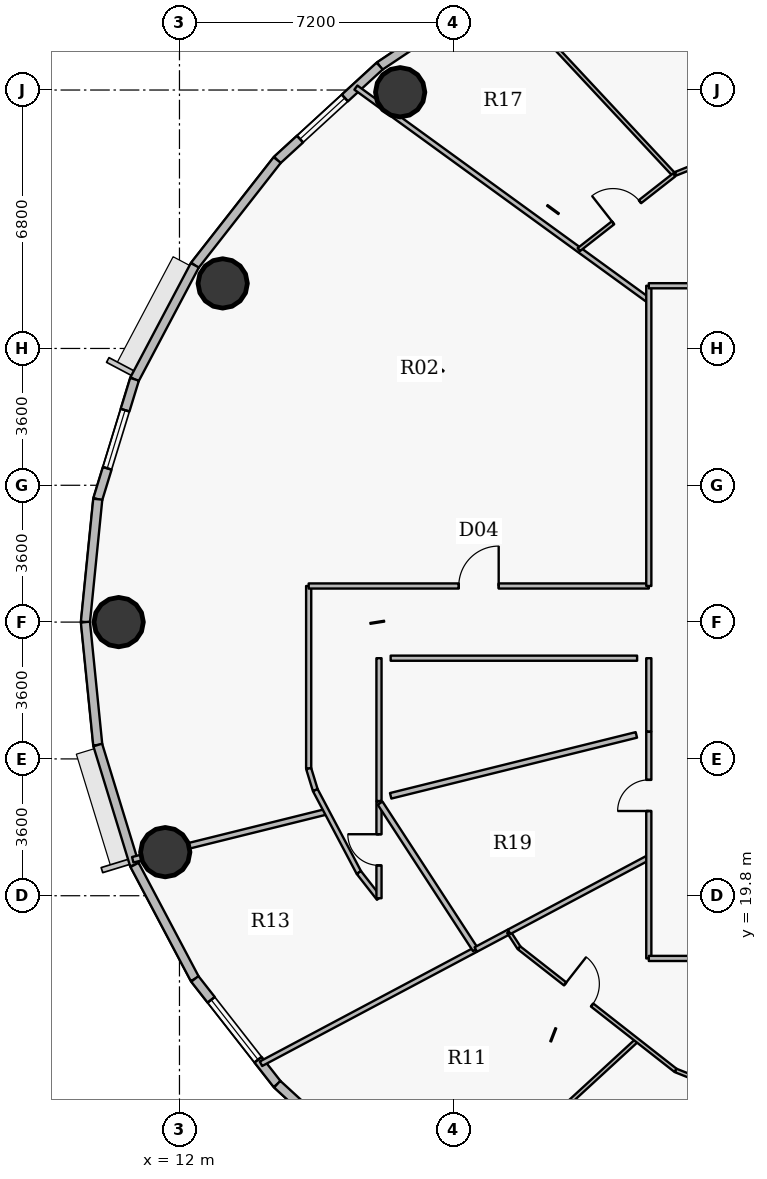
"""IFC4 building model, lengths in metres.
Left out: names, types, materials, properties, quantities, classifications, styles, units other than length and angle.
Written with IfcOpenShell. Run it as: python <this file> out.ifc"""

import sys

from ifc_helpers import new_model, si_unit, direction, frame, frame_2d, origin, origin_2d, place, context, subcontext, project, spatial, rectangle, hollow_circle, extrude, source, transform, mapped, element, fill, save


model = new_model("IFC4")
c1 = context("Model", 3, precision=1e-05, world=origin(), true_north=direction((0.0, 1.0)))
c2 = subcontext(c1, "Body", "Model", "MODEL_VIEW")
j1 = project(units=[si_unit("LENGTHUNIT", "METRE"), si_unit("PLANEANGLEUNIT", "RADIAN")], contexts=[c1])
p1 = place(None, origin())
s1 = spatial("IfcSite", under=j1, at=p1, CompositionType="ELEMENT")
p2 = place(p1, origin())
s2 = spatial("IfcBuilding", under=s1, at=p2, CompositionType="ELEMENT")
p3 = place(p2, frame((0.0, 0.0, 193.65)))
s3 = spatial("IfcBuildingStorey", under=s2, at=p3, CompositionType="ELEMENT", Elevation=193.65)
for number, where, z_axis, x_axis in (
    (1, (17.808, 40.942, 0.0), (0.0, 0.0, 1.0), (1.0, 0.0, 0.0)),
    (2, (13.137, 35.911, 0.0), (0.0, 0.0, 1.0), (1.0, 0.0, 0.0)),
    (3, (10.4, 27.0, 0.0), (0.0, 0.0, 1.0), (1.0, 0.0, 0.0)),
    (4, (11.625, 20.947, 0.0), (0.0, 0.0, 1.0), (1.0, 0.0, 0.0)),
):
    element("IfcColumn", number, at=place(p3, frame(where, z_axis=z_axis, x_axis=x_axis)), inside=s3, PredefinedType="COLUMN", context=c2, shape_type="SweptSolid", body=[
        extrude(hollow_circle(Radius=0.65, WallThickness=0.04, at=origin_2d()), origin(), (0.0, 0.0, 1.0), 3.75),
    ])
p4 = place(p3, frame((17.268, 41.631, 0.0), z_axis=(0.0, 0.0, 1.0), x_axis=(0.831228998277, 0.555930168657, 0.0)))
e5 = element("IfcWall", 5, at=p4, inside=s3, PredefinedType="SOLIDWALL", context=c2, shape_type="SweptSolid", body=[
    extrude(rectangle(XDim=3.8, YDim=0.24, at=frame_2d((1.9, 0.0))), origin(), (0.0, 0.0, 1.0), 3.5),
])
p5 = place(p3, frame((14.572, 39.158, 0.0), z_axis=(0.0, 0.0, 1.0), x_axis=(0.737076565834, 0.675809245349, 0.0)))
e6 = element("IfcWall", 6, at=p5, inside=s3, PredefinedType="SOLIDWALL", context=c2, shape_type="SweptSolid", body=[
    extrude(rectangle(XDim=3.658, YDim=0.24, at=frame_2d((1.829, 0.0))), origin(), (0.0, 0.0, 1.0), 3.5),
])
p6 = place(p5, frame((0.815, 0.0, 0.9)))
e7 = element("IfcOpeningElement", 7, at=p6, cuts=e6, PredefinedType="OPENING", context=c2, shape_type="SweptSolid", body=[
    extrude(rectangle(XDim=1.6, YDim=1.75, at=origin_2d()), frame((0.8, 0.13, 0.875), z_axis=(0.0, -1.0, 0.0), x_axis=(1.0, 0.0, 0.0)), (0.0, 0.0, 1.0), 0.26),
])
p7 = place(p3, frame((12.404, 36.388, 0.0), z_axis=(0.0, 0.0, 1.0), x_axis=(0.616287674549, 0.787521112224, 0.0)))
e8 = element("IfcWall", 8, at=p7, inside=s3, PredefinedType="SOLIDWALL", context=c2, shape_type="SweptSolid", body=[
    extrude(rectangle(XDim=3.517, YDim=0.24, at=frame_2d((1.759, 0.0))), origin(), (0.0, 0.0, 1.0), 3.5),
])
p8 = place(p3, frame((10.817, 33.389, 0.0), z_axis=(0.0, 0.0, 1.0), x_axis=(0.467586874938, 0.88394712194, 0.0)))
e9 = element("IfcWall", 9, at=p8, inside=s3, PredefinedType="SOLIDWALL", context=c2, shape_type="SweptSolid", body=[
    extrude(rectangle(XDim=3.393, YDim=0.24, at=frame_2d((1.697, 0.0))), origin(), (0.0, 0.0, 1.0), 3.5),
])
p9 = place(p3, frame((9.85, 30.234, 0.0), z_axis=(0.0, 0.0, 1.0), x_axis=(0.293097995113, 0.956082405058, 0.0)))
e10 = element("IfcWall", 10, at=p9, inside=s3, PredefinedType="SOLIDWALL", context=c2, shape_type="SweptSolid", body=[
    extrude(rectangle(XDim=3.3, YDim=0.24, at=frame_2d((1.65, 0.0))), origin(), (0.0, 0.0, 1.0), 3.5),
])
p10 = place(p9, frame((0.85, 0.0, 0.9)))
e11 = element("IfcOpeningElement", 11, at=p10, cuts=e10, PredefinedType="OPENING", context=c2, shape_type="SweptSolid", body=[
    extrude(rectangle(XDim=1.6, YDim=1.75, at=origin_2d()), frame((0.8, 0.13, 0.875), z_axis=(0.0, -1.0, 0.0), x_axis=(1.0, 0.0, 0.0)), (0.0, 0.0, 1.0), 0.26),
])
for number, where, z_axis, x_axis in (
    (12, (9.525, 27.0, 0.0), (0.0, 0.0, 1.0), (0.1, 0.995, 0.0)),
    (13, (9.85, 23.766, 0.0), (0.0, 0.0, 1.0), (-0.1, 0.995, 0.0)),
):
    element("IfcWall", number, at=place(p3, frame(where, z_axis=z_axis, x_axis=x_axis)), inside=s3, PredefinedType="SOLIDWALL", context=c2, shape_type="SweptSolid", body=[
        extrude(rectangle(XDim=3.25, YDim=0.24, at=frame_2d((1.625, 0.0))), origin(), (0.0, 0.0, 1.0), 3.5),
    ])
p11 = place(p3, frame((10.817, 20.611, 0.0), z_axis=(0.0, 0.0, 1.0), x_axis=(-0.293097995113, 0.956082405058, 0.0)))
e14 = element("IfcWall", 14, at=p11, inside=s3, PredefinedType="SOLIDWALL", context=c2, shape_type="SweptSolid", body=[
    extrude(rectangle(XDim=3.3, YDim=0.24, at=frame_2d((1.65, 0.0))), origin(), (0.0, 0.0, 1.0), 3.5),
])
p12 = place(p3, frame((12.404, 17.612, 0.0), z_axis=(0.0, 0.0, 1.0), x_axis=(-0.467586874938, 0.88394712194, 0.0)))
e15 = element("IfcWall", 15, at=p12, inside=s3, PredefinedType="SOLIDWALL", context=c2, shape_type="SweptSolid", body=[
    extrude(rectangle(XDim=3.393, YDim=0.24, at=frame_2d((1.697, 0.0))), origin(), (0.0, 0.0, 1.0), 3.5),
])
p13 = place(p3, frame((14.572, 14.842, 0.0), z_axis=(0.0, 0.0, 1.0), x_axis=(-0.616287674549, 0.787521112224, 0.0)))
e16 = element("IfcWall", 16, at=p13, inside=s3, PredefinedType="SOLIDWALL", context=c2, shape_type="SweptSolid", body=[
    extrude(rectangle(XDim=3.517, YDim=0.24, at=frame_2d((1.759, 0.0))), origin(), (0.0, 0.0, 1.0), 3.5),
])
p14 = place(p13, frame((0.819, 0.0, 0.9)))
e17 = element("IfcOpeningElement", 17, at=p14, cuts=e16, PredefinedType="OPENING", context=c2, shape_type="SweptSolid", body=[
    extrude(rectangle(XDim=2.0, YDim=1.75, at=origin_2d()), frame((1.0, 0.13, 0.875), z_axis=(0.0, -1.0, 0.0), x_axis=(1.0, 0.0, 0.0)), (0.0, 0.0, 1.0), 0.26),
])
p15 = place(p3, frame((17.268, 12.369, 0.0), z_axis=(0.0, 0.0, 1.0), x_axis=(-0.737076565834, 0.675809245349, 0.0)))
e18 = element("IfcWall", 18, at=p15, inside=s3, PredefinedType="SOLIDWALL", context=c2, shape_type="SweptSolid", body=[
    extrude(rectangle(XDim=3.658, YDim=0.24, at=frame_2d((1.829, 0.0))), origin(), (0.0, 0.0, 1.0), 3.5),
])
p16 = place(p15, frame((1.204, 0.0, 0.9)))
e19 = element("IfcOpeningElement", 19, at=p16, cuts=e18, PredefinedType="OPENING", context=c2, shape_type="SweptSolid", body=[
    extrude(rectangle(XDim=1.25, YDim=1.65, at=origin_2d()), frame((0.625, 0.13, 0.825), z_axis=(0.0, -1.0, 0.0), x_axis=(1.0, 0.0, 0.0)), (0.0, 0.0, 1.0), 0.26),
])
p17 = place(p3, frame((10.771, 20.747, 0.0), z_axis=(0.0, 0.0, 1.0), x_axis=(0.970640303721, 0.240535653891, 0.0)))
e20 = element("IfcWall", 20, at=p17, inside=s3, PredefinedType="PARTITIONING", context=c2, shape_type="SweptSolid", body=[
    extrude(rectangle(XDim=5.258, YDim=0.15, at=frame_2d((2.629, 0.0))), origin(), (0.0, 0.0, 1.0), 2.935),
])
p18 = place(p3, frame((14.145, 15.379, 0.0), z_axis=(0.0, 0.0, 1.0), x_axis=(0.882932689309, 0.469499591214, 0.0)))
e21 = element("IfcWall", 21, at=p18, inside=s3, PredefinedType="PARTITIONING", context=c2, shape_type="SweptSolid", body=[
    extrude(rectangle(XDim=6.392, YDim=0.135, at=frame_2d((3.196, 0.0))), origin(), (0.0, 0.0, 1.0), 2.935),
])
p19 = place(p3, frame((15.4, 23.146, 0.0), z_axis=(0.0, 0.0, 1.0), x_axis=(0.0, 1.0, 0.0)))
e22 = element("IfcWall", 22, at=p19, inside=s3, PredefinedType="PARTITIONING", context=c2, shape_type="SweptSolid", body=[
    extrude(rectangle(XDim=4.804, YDim=0.135, at=frame_2d((2.402, 0.0))), origin(), (0.0, 0.0, 1.0), 2.935),
])
p20 = place(p3, frame((15.4, 23.146, 0.0), z_axis=(0.0, 0.0, 1.0), x_axis=(0.293335154151, -0.956009669061, 0.0)))
e23 = element("IfcWall", 23, at=p20, inside=s3, PredefinedType="PARTITIONING", context=c2, shape_type="SweptSolid", body=[
    extrude(rectangle(XDim=0.594, YDim=0.135, at=frame_2d((0.297, 0.0))), origin(), (0.0, 0.0, 1.0), 3.5),
])
p21 = place(p3, frame((15.4, 27.95, 0.0), z_axis=(0.0, 0.0, 1.0), x_axis=(1.0, 0.0, 0.0)))
e24 = element("IfcWall", 24, at=p21, inside=s3, PredefinedType="PARTITIONING", context=c2, shape_type="SweptSolid", body=[
    extrude(rectangle(XDim=8.95, YDim=0.135, at=frame_2d((4.475, 0.0))), origin(), (0.0, 0.0, 1.0), 3.5),
])
p22 = place(p21, frame((3.95, 0.0, 0.0)))
e25 = element("IfcOpeningElement", 25, at=p22, cuts=e24, PredefinedType="OPENING", context=c2, shape_type="SweptSolid", body=[
    extrude(rectangle(XDim=1.05, YDim=2.15, at=origin_2d()), frame((0.525, 0.078, 1.075), z_axis=(0.0, -1.0, 0.0), x_axis=(1.0, 0.0, 0.0)), (0.0, 0.0, 1.0), 0.155),
])
p23 = place(p3, frame((15.574, 22.578, 0.0), z_axis=(0.0, 0.0, 1.0), x_axis=(0.467530807018, -0.883976778252, 0.0)))
e26 = element("IfcWall", 26, at=p23, inside=s3, PredefinedType="PARTITIONING", context=c2, shape_type="SweptSolid", body=[
    extrude(rectangle(XDim=2.452, YDim=0.135, at=frame_2d((1.226, 0.0))), origin(), (0.0, 0.0, 1.0), 2.935),
])
p24 = place(p3, frame((16.643, 41.064, 0.0), z_axis=(0.0, 0.0, 1.0), x_axis=(0.809016355942, -0.587786131018, 0.0)))
e27 = element("IfcWall", 27, at=p24, inside=s3, PredefinedType="PARTITIONING", context=c2, shape_type="SweptSolid", body=[
    extrude(rectangle(XDim=9.527, YDim=0.135, at=frame_2d((4.764, 0.0))), origin(), (0.0, 0.0, 1.0), 2.935),
])
p25 = place(p3, frame((16.72, 20.411, 0.0), z_axis=(0.0, 0.0, 1.0), x_axis=(0.616377221056, -0.787451027914, 0.0)))
e28 = element("IfcWall", 28, at=p25, inside=s3, PredefinedType="PARTITIONING", context=c2, shape_type="SweptSolid", body=[
    extrude(rectangle(XDim=0.859, YDim=0.135, at=frame_2d((0.43, 0.0))), origin(), (0.0, 0.0, 1.0), 3.5),
])
p26 = place(p3, frame((17.25, 19.734, 0.0), z_axis=(0.0, 0.0, 1.0), x_axis=(0.0, 1.0, 0.0)))
e29 = element("IfcWall", 29, at=p26, inside=s3, PredefinedType="PARTITIONING", context=c2, shape_type="SweptSolid", body=[
    extrude(rectangle(XDim=2.548, YDim=0.135, at=frame_2d((1.274, 0.0))), origin(), (0.0, 0.0, 1.0), 2.935),
])
p27 = place(p26, frame((0.864, 0.0, 0.0)))
e30 = element("IfcOpeningElement", 30, at=p27, cuts=e29, PredefinedType="OPENING", context=c2, shape_type="SweptSolid", body=[
    extrude(rectangle(XDim=0.82, YDim=2.1, at=origin_2d()), frame((0.41, 0.078, 1.05), z_axis=(0.0, -1.0, 0.0), x_axis=(1.0, 0.0, 0.0)), (0.0, 0.0, 1.0), 0.155),
])
p28 = place(p3, frame((17.279, 22.237, 0.0), z_axis=(0.0, 0.0, 1.0), x_axis=(0.545383699519, -0.83818650687, 0.0)))
e31 = element("IfcWall", 31, at=p28, inside=s3, PredefinedType="PARTITIONING", context=c2, shape_type="SweptSolid", body=[
    extrude(rectangle(XDim=4.601, YDim=0.15, at=frame_2d((2.3, 0.0))), origin(), (0.0, 0.0, 1.0), 2.935),
])
p29 = place(p3, frame((18.899, 11.272, 0.0), z_axis=(0.0, 0.0, 1.0), x_axis=(0.736047362481, 0.676930040834, 0.0)))
e32 = element("IfcWall", 32, at=p29, inside=s3, PredefinedType="PARTITIONING", context=c2, shape_type="SweptSolid", body=[
    extrude(rectangle(XDim=6.983, YDim=0.1, at=frame_2d((3.492, 0.0))), origin(), (0.0, 0.0, 1.0), 2.935),
])
p30 = place(p3, frame((19.798, 18.385, 0.0), z_axis=(0.0, 0.0, 1.0), x_axis=(0.882964446326, 0.469439864652, 0.0)))
e33 = element("IfcWall", 33, at=p30, inside=s3, PredefinedType="PARTITIONING", context=c2, shape_type="SweptSolid", body=[
    extrude(rectangle(XDim=0.982, YDim=0.135, at=frame_2d((0.491, 0.0))), origin(), (0.0, 0.0, 1.0), 3.5),
])
p31 = place(p3, frame((20.39, 43.725, 0.0), z_axis=(0.0, 0.0, 1.0), x_axis=(0.682297728918, -0.73107442105, 0.0)))
e34 = element("IfcWall", 34, at=p31, inside=s3, PredefinedType="PARTITIONING", context=c2, shape_type="SweptSolid", body=[
    extrude(rectangle(XDim=6.782, YDim=0.1, at=frame_2d((3.391, 0.0))), origin(), (0.0, 0.0, 1.0), 2.935),
])
p32 = place(p3, frame((20.665, 18.846, 0.0), z_axis=(0.0, 0.0, 1.0), x_axis=(0.545143704476, -0.838342615802, 0.0)))
e35 = element("IfcWall", 35, at=p32, inside=s3, PredefinedType="PARTITIONING", context=c2, shape_type="SweptSolid", body=[
    extrude(rectangle(XDim=0.497, YDim=0.1, at=frame_2d((0.249, 0.0))), origin(), (0.0, 0.0, 1.0), 3.5),
])
p33 = place(p3, frame((20.674, 18.851, 0.0), z_axis=(0.0, 0.0, 1.0), x_axis=(0.882934968765, 0.469495304483, 0.0)))
e36 = element("IfcWall", 36, at=p33, inside=s3, PredefinedType="PARTITIONING", context=c2, shape_type="SweptSolid", body=[
    extrude(rectangle(XDim=4.164, YDim=0.135, at=frame_2d((2.082, 0.0))), origin(), (0.0, 0.0, 1.0), 3.5),
])
p34 = place(p3, frame((20.936, 18.429, 0.0), z_axis=(0.0, 0.0, 1.0), x_axis=(0.787322805473, -0.61654099619, 0.0)))
e37 = element("IfcWall", 37, at=p34, inside=s3, PredefinedType="PARTITIONING", context=c2, shape_type="SweptSolid", body=[
    extrude(rectangle(XDim=5.232, YDim=0.1, at=frame_2d((2.616, 0.0))), origin(), (0.0, 0.0, 1.0), 2.935),
])
p35 = place(p34, frame((1.541, 0.0, 0.0)))
e38 = element("IfcOpeningElement", 38, at=p35, cuts=e37, PredefinedType="OPENING", context=c2, shape_type="SweptSolid", body=[
    extrude(rectangle(XDim=0.9, YDim=2.1, at=origin_2d()), frame((0.45, 0.06, 1.05), z_axis=(0.0, -1.0, 0.0), x_axis=(1.0, 0.0, 0.0)), (0.0, 0.0, 1.0), 0.12),
])
p36 = place(p3, frame((22.509, 36.802, 0.0), z_axis=(0.0, 0.0, 1.0), x_axis=(0.787322269852, 0.616541680177, 0.0)))
e39 = element("IfcWall", 39, at=p36, inside=s3, PredefinedType="PARTITIONING", context=c2, shape_type="SweptSolid", body=[
    extrude(rectangle(XDim=3.187, YDim=0.1, at=frame_2d((1.593, 0.0))), origin(), (0.0, 0.0, 1.0), 2.935),
])
p37 = place(p36, frame((1.143, 0.0, 0.0)))
e40 = element("IfcOpeningElement", 40, at=p37, cuts=e39, PredefinedType="OPENING", context=c2, shape_type="SweptSolid", body=[
    extrude(rectangle(XDim=0.9, YDim=2.1, at=origin_2d()), frame((0.45, 0.06, 1.05), z_axis=(0.0, -1.0, 0.0), x_axis=(1.0, 0.0, 0.0)), (0.0, 0.0, 1.0), 0.12),
])
p38 = place(p3, frame((23.136, 8.951, 0.0), z_axis=(0.0, 0.0, 1.0), x_axis=(0.580415349728, 0.814320589081, 0.0)))
e41 = element("IfcWall", 41, at=p38, inside=s3, PredefinedType="PARTITIONING", context=c2, shape_type="SweptSolid", body=[
    extrude(rectangle(XDim=6.71, YDim=0.1, at=frame_2d((3.355, 0.0))), origin(), (0.0, 0.0, 1.0), 2.935),
])
p39 = place(p3, frame((24.35, 18.15, 0.0), z_axis=(0.0, 0.0, 1.0), x_axis=(0.0, 1.0, 0.0)))
e42 = element("IfcWall", 42, at=p39, inside=s3, PredefinedType="PARTITIONING", context=c2, shape_type="SweptSolid", body=[
    extrude(rectangle(XDim=5.963, YDim=0.135, at=frame_2d((2.981, 0.0))), origin(), (0.0, 0.0, 1.0), 2.935),
])
p40 = place(p39, frame((3.879, 0.0, 0.0)))
e43 = element("IfcOpeningElement", 43, at=p40, cuts=e42, PredefinedType="OPENING", context=c2, shape_type="SweptSolid", body=[
    extrude(rectangle(XDim=0.82, YDim=2.1, at=origin_2d()), frame((0.41, 0.078, 1.05), z_axis=(0.0, -1.0, 0.0), x_axis=(1.0, 0.0, 0.0)), (0.0, 0.0, 1.0), 0.155),
])
p41 = place(p3, frame((24.35, 18.15, 0.0), z_axis=(0.0, 0.0, 1.0), x_axis=(1.0, 0.0, 0.0)))
e44 = element("IfcWall", 44, at=p41, inside=s3, PredefinedType="PARTITIONING", context=c2, shape_type="SweptSolid", body=[
    extrude(rectangle(XDim=9.109, YDim=0.135, at=frame_2d((4.554, 0.0))), origin(), (0.0, 0.0, 1.0), 2.935),
])
p42 = place(p41, frame((4.054, 0.0, 0.0)))
e45 = element("IfcOpeningElement", 45, at=p42, cuts=e44, PredefinedType="OPENING", context=c2, shape_type="SweptSolid", body=[
    extrude(rectangle(XDim=1.0, YDim=2.15, at=origin_2d()), frame((0.5, 0.078, 1.075), z_axis=(0.0, -1.0, 0.0), x_axis=(1.0, 0.0, 0.0)), (0.0, 0.0, 1.0), 0.155),
])
p43 = place(p3, frame((24.35, 27.95, 0.0), z_axis=(0.0, 0.0, 1.0), x_axis=(0.0, 1.0, 0.0)))
e46 = element("IfcWall", 46, at=p43, inside=s3, PredefinedType="PARTITIONING", context=c2, shape_type="SweptSolid", body=[
    extrude(rectangle(XDim=7.9, YDim=0.135, at=frame_2d((3.95, 0.0))), origin(), (0.0, 0.0, 1.0), 2.935),
])
p44 = place(p3, frame((24.35, 35.85, 0.0), z_axis=(0.0, 0.0, 1.0), x_axis=(1.0, 0.0, 0.0)))
e47 = element("IfcWall", 47, at=p44, inside=s3, PredefinedType="PARTITIONING", context=c2, shape_type="SweptSolid", body=[
    extrude(rectangle(XDim=11.942, YDim=0.135, at=frame_2d((5.971, 0.0))), origin(), (0.0, 0.0, 1.0), 2.935),
])
p45 = place(p44, frame((5.471, 0.0, 0.0)))
e48 = element("IfcOpeningElement", 48, at=p45, cuts=e47, PredefinedType="OPENING", context=c2, shape_type="SweptSolid", body=[
    extrude(rectangle(XDim=1.0, YDim=2.15, at=origin_2d()), frame((0.5, 0.078, 1.075), z_axis=(0.0, -1.0, 0.0), x_axis=(1.0, 0.0, 0.0)), (0.0, 0.0, 1.0), 0.155),
])
p46 = place(p3, frame((25.055, 15.204, 0.0), z_axis=(0.0, 0.0, 1.0), x_axis=(0.928798710424, -0.370584613166, 0.0)))
e49 = element("IfcWall", 49, at=p46, inside=s3, PredefinedType="PARTITIONING", context=c2, shape_type="SweptSolid", body=[
    extrude(rectangle(XDim=5.589, YDim=0.1, at=frame_2d((2.794, 0.0))), origin(), (0.0, 0.0, 1.0), 2.935),
])
p47 = place(p46, frame((0.633, 0.0, 0.0)))
e50 = element("IfcOpeningElement", 50, at=p47, cuts=e49, PredefinedType="OPENING", context=c2, shape_type="SweptSolid", body=[
    extrude(rectangle(XDim=0.9, YDim=2.1, at=origin_2d()), frame((0.45, 0.06, 1.05), z_axis=(0.0, -1.0, 0.0), x_axis=(1.0, 0.0, 0.0)), (0.0, 0.0, 1.0), 0.12),
])
p48 = place(p3, frame((25.055, 38.796, 0.0), z_axis=(0.0, 0.0, 1.0), x_axis=(0.928801214375, 0.370578337434, 0.0)))
e51 = element("IfcWall", 51, at=p48, inside=s3, PredefinedType="PARTITIONING", context=c2, shape_type="SweptSolid", body=[
    extrude(rectangle(XDim=4.664, YDim=0.1, at=frame_2d((2.332, 0.0))), origin(), (0.0, 0.0, 1.0), 3.5),
])
p49 = place(p3, frame((17.25, 26.05, 0.0), z_axis=(0.0, 0.0, 1.0), x_axis=(0.0, -1.0, 0.0)))
e52 = element("IfcWall", 52, at=p49, inside=s3, PredefinedType="PARTITIONING", context=c2, shape_type="SweptSolid", body=[
    extrude(rectangle(XDim=3.758, YDim=0.135, at=frame_2d((1.879, 0.0))), origin(), (0.0, 0.0, 1.0), 2.935),
])
p50 = place(p3, frame((24.35, 24.123, 0.0), z_axis=(0.0, 0.0, 1.0), x_axis=(0.0, 1.0, 0.0)))
e53 = element("IfcWall", 53, at=p50, inside=s3, PredefinedType="PARTITIONING", context=c2, shape_type="SweptSolid", body=[
    extrude(rectangle(XDim=1.927, YDim=0.135, at=frame_2d((0.964, 0.0))), origin(), (0.0, 0.0, 1.0), 2.935),
])
p51 = place(p3, frame((24.042, 26.05, 0.0), z_axis=(0.0, 0.0, 1.0), x_axis=(-1.0, 0.0, 0.0)))
e54 = element("IfcWall", 54, at=p51, inside=s3, PredefinedType="PARTITIONING", context=c2, shape_type="SweptSolid", body=[
    extrude(rectangle(XDim=6.485, YDim=0.135, at=frame_2d((3.242, 0.0))), origin(), (0.0, 0.0, 1.0), 3.5),
])
p52 = place(p3, frame((17.558, 22.429, 0.0), z_axis=(0.0, 0.0, 1.0), x_axis=(0.970632119323, 0.240568678214, 0.0)))
e55 = element("IfcWall", 55, at=p52, inside=s3, PredefinedType="PARTITIONING", context=c2, shape_type="SweptSolid", body=[
    extrude(rectangle(XDim=6.66, YDim=0.15, at=frame_2d((3.33, 0.0))), origin(), (0.0, 0.0, 1.0), 2.935),
])
m1 = source(origin(), c2, "Body", "SweptSolid", [
    extrude(rectangle(XDim=1.6, YDim=1.75, at=origin_2d()), frame((0.8, 0.03, 0.875), z_axis=(0.0, -1.0, 0.0), x_axis=(1.0, 0.0, 0.0)), (0.0, 0.0, 1.0), 0.06),
])
p53 = place(p6, origin())
e56 = element("IfcWindow", 56, at=p53, inside=s3, PartitioningType="DOUBLE_PANEL_VERTICAL", PredefinedType="WINDOW", context=c2, shape_type="MappedRepresentation", body=[
    mapped(m1, transform((0.0, 0.0, 0.0), x_axis=(1.0, 0.0, 0.0), y_axis=(0.0, 1.0, 0.0), z_axis=(0.0, 0.0, 1.0), scale=1.0)),
])
fill(e7, e56)
p54 = place(p10, origin())
e57 = element("IfcWindow", 57, at=p54, inside=s3, PartitioningType="DOUBLE_PANEL_VERTICAL", PredefinedType="WINDOW", context=c2, shape_type="MappedRepresentation", body=[
    mapped(m1, transform((0.0, 0.0, 0.0), x_axis=(1.0, 0.0, 0.0), y_axis=(0.0, 1.0, 0.0), z_axis=(0.0, 0.0, 1.0), scale=1.0)),
])
fill(e11, e57)
m2 = source(origin(), c2, "Body", "SweptSolid", [
    extrude(rectangle(XDim=2.0, YDim=1.75, at=origin_2d()), frame((1.0, 0.03, 0.875), z_axis=(0.0, -1.0, 0.0), x_axis=(1.0, 0.0, 0.0)), (0.0, 0.0, 1.0), 0.06),
])
p55 = place(p14, origin())
e58 = element("IfcWindow", 58, at=p55, inside=s3, PartitioningType="DOUBLE_PANEL_VERTICAL", PredefinedType="WINDOW", context=c2, shape_type="MappedRepresentation", body=[
    mapped(m2, transform((0.0, 0.0, 0.0), x_axis=(1.0, 0.0, 0.0), y_axis=(0.0, 1.0, 0.0), z_axis=(0.0, 0.0, 1.0), scale=1.0)),
])
fill(e17, e58)
m3 = source(origin(), c2, "Body", "SweptSolid", [
    extrude(rectangle(XDim=0.9, YDim=2.1, at=origin_2d()), frame((0.45, 0.025, 1.05), z_axis=(0.0, -1.0, 0.0), x_axis=(1.0, 0.0, 0.0)), (0.0, 0.0, 1.0), 0.05),
])
p56 = place(p35, origin())
e59 = element("IfcDoor", 59, at=p56, inside=s3, OperationType="SINGLE_SWING_LEFT", PredefinedType="DOOR", context=c2, shape_type="MappedRepresentation", body=[
    mapped(m3, transform((0.0, 0.0, 0.0), x_axis=(1.0, 0.0, 0.0), y_axis=(0.0, 1.0, 0.0), z_axis=(0.0, 0.0, 1.0), scale=1.0)),
])
fill(e38, e59)
p57 = place(p37, origin())
e60 = element("IfcDoor", 60, at=p57, inside=s3, OperationType="SINGLE_SWING_LEFT", PredefinedType="DOOR", context=c2, shape_type="MappedRepresentation", body=[
    mapped(m3, transform((0.0, 0.0, 0.0), x_axis=(1.0, 0.0, 0.0), y_axis=(0.0, 1.0, 0.0), z_axis=(0.0, 0.0, 1.0), scale=1.0)),
])
fill(e40, e60)
m4 = source(origin(), c2, "Body", "SweptSolid", [
    extrude(rectangle(XDim=1.05, YDim=2.15, at=origin_2d()), frame((0.525, 0.025, 1.075), z_axis=(0.0, -1.0, 0.0), x_axis=(1.0, 0.0, 0.0)), (0.0, 0.0, 1.0), 0.05),
])
p58 = place(p22, origin())
e61 = element("IfcDoor", 61, at=p58, inside=s3, OperationType="SINGLE_SWING_RIGHT", PredefinedType="DOOR", context=c2, shape_type="MappedRepresentation", body=[
    mapped(m4, transform((0.0, 0.0, 0.0), x_axis=(1.0, 0.0, 0.0), y_axis=(0.0, 1.0, 0.0), z_axis=(0.0, 0.0, 1.0), scale=1.0)),
])
fill(e25, e61)
m5 = source(origin(), c2, "Body", "SweptSolid", [
    extrude(rectangle(XDim=0.82, YDim=2.1, at=origin_2d()), frame((0.41, 0.025, 1.05), z_axis=(0.0, -1.0, 0.0), x_axis=(1.0, 0.0, 0.0)), (0.0, 0.0, 1.0), 0.05),
])
p59 = place(p40, origin())
e62 = element("IfcDoor", 62, at=p59, inside=s3, OperationType="SINGLE_SWING_LEFT", PredefinedType="DOOR", context=c2, shape_type="MappedRepresentation", body=[
    mapped(m5, transform((0.0, 0.0, 0.0), x_axis=(1.0, 0.0, 0.0), y_axis=(0.0, 1.0, 0.0), z_axis=(0.0, 0.0, 1.0), scale=1.0)),
])
fill(e43, e62)
p60 = place(p27, origin())
e63 = element("IfcDoor", 63, at=p60, inside=s3, OperationType="SINGLE_SWING_RIGHT", PredefinedType="DOOR", context=c2, shape_type="MappedRepresentation", body=[
    mapped(m5, transform((0.0, 0.0, 0.0), x_axis=(1.0, 0.0, 0.0), y_axis=(0.0, 1.0, 0.0), z_axis=(0.0, 0.0, 1.0), scale=1.0)),
])
fill(e30, e63)
save(model, sys.argv[1])
